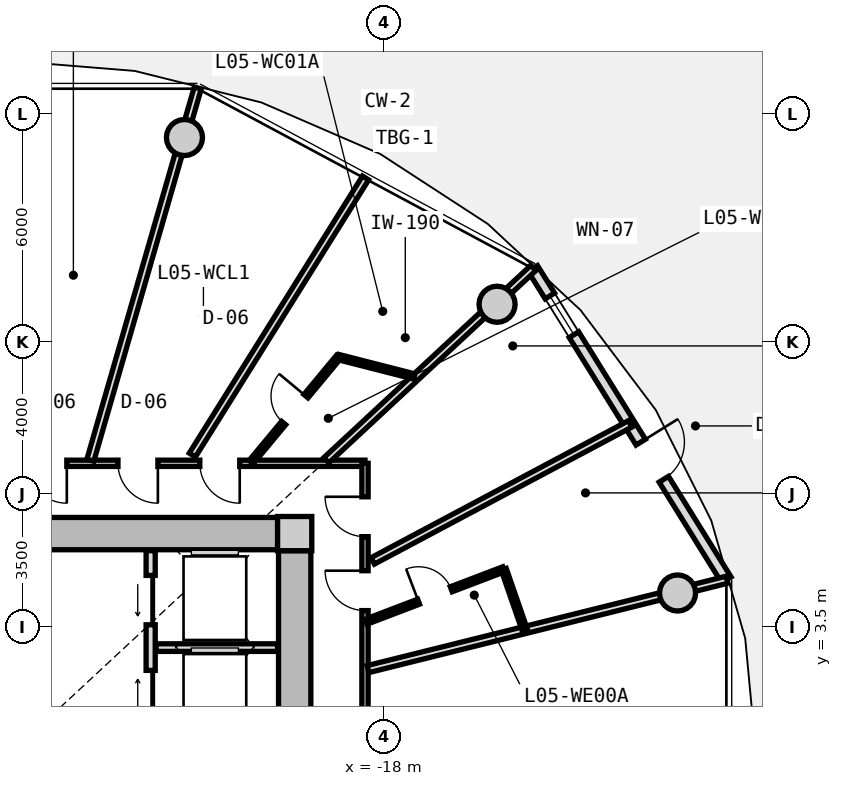
"""IFC4 building model, lengths in metres.
Left out: names, types, materials, properties, quantities, classifications, styles, units other than length and angle.
Written with IfcOpenShell. Run it as: python <this file> out.ifc"""

import sys

from ifc_helpers import new_model, si_unit, direction, frame, frame_2d, origin, origin_2d, place, context, subcontext, project, spatial, rectangle, circle, extrude, source, transform, mapped, element, fill, save


model = new_model("IFC4")
c1 = context("Model", 3, precision=1e-05, world=origin(), true_north=direction((0.0, 1.0)))
c2 = subcontext(c1, "Body", "Model", "MODEL_VIEW")
j1 = project(units=[si_unit("LENGTHUNIT", "METRE"), si_unit("PLANEANGLEUNIT", "RADIAN")], contexts=[c1])
p1 = place(None, origin())
s1 = spatial("IfcSite", under=j1, at=p1, CompositionType="ELEMENT")
p2 = place(p1, origin())
s2 = spatial("IfcBuilding", under=s1, at=p2, CompositionType="ELEMENT")
p3 = place(p2, frame((0.0, 0.0, 21.6)))
s3 = spatial("IfcBuildingStorey", under=s2, at=p3, CompositionType="ELEMENT", Elevation=21.6)
m1 = source(origin(), c2, "Body", "SweptSolid", [
    extrude(rectangle(XDim=0.9, YDim=0.9, at=origin_2d()), origin(), (0.0, 0.0, 1.0), 3.05),
])
p4 = place(p3, frame((-20.35, 5.95, 0.0), z_axis=(0.0, 0.0, 1.0), x_axis=(1.0, 0.0, 0.0)))
e1 = element("IfcColumn", 1, at=p4, inside=s3, PredefinedType="COLUMN", context=c2, shape_type="MappedRepresentation", body=[
    mapped(m1, transform((0.0, 0.0, 0.0), x_axis=(1.0, 0.0, 0.0), y_axis=(0.0, 1.0, 0.0), z_axis=(0.0, 0.0, 1.0), scale=1.0)),
])
m2 = source(origin(), c2, "Body", "SweptSolid", [
    extrude(rectangle(XDim=14.4, YDim=0.85, at=frame_2d((7.2, 0.0))), origin(), (0.0, 0.0, 1.0), 2.79),
])
p5 = place(p3, frame((-35.2, 5.95, 0.0), z_axis=(0.0, 0.0, 1.0), x_axis=(1.0, 0.0, 0.0)))
e2 = element("IfcWall", 2, at=p5, inside=s3, PredefinedType="SHEAR", context=c2, shape_type="MappedRepresentation", body=[
    mapped(m2, transform((0.0, 0.0, 0.0), x_axis=(1.0, 0.0, 0.0), y_axis=(0.0, 1.0, 0.0), z_axis=(0.0, 0.0, 1.0), scale=1.0)),
])
m3 = source(origin(), c2, "Body", "SweptSolid", [
    extrude(rectangle(XDim=11.0, YDim=0.85, at=frame_2d((5.5, 0.0))), origin(), (0.0, 0.0, 1.0), 2.79),
])
p6 = place(p3, frame((-20.35, 5.5, 0.0), z_axis=(0.0, 0.0, 1.0), x_axis=(0.0, -1.0, 0.0)))
e3 = element("IfcWall", 3, at=p6, inside=s3, PredefinedType="SHEAR", context=c2, shape_type="MappedRepresentation", body=[
    mapped(m3, transform((0.0, 0.0, 0.0), x_axis=(1.0, 0.0, 0.0), y_axis=(0.0, 1.0, 0.0), z_axis=(0.0, 0.0, 1.0), scale=1.0)),
])
p7 = place(p6, frame((5.65, 0.0, 0.0)))
e4 = element("IfcOpeningElement", 4, at=p7, cuts=e3, PredefinedType="OPENING", context=c2, shape_type="SweptSolid", body=[
    extrude(rectangle(XDim=1.2, YDim=2.15, at=frame_2d((0.6, 1.075))), frame((0.0, 0.435, 0.0), z_axis=(0.0, -1.0, 0.0), x_axis=(1.0, 0.0, 0.0)), (0.0, 0.0, 1.0), 0.87),
])
p8 = place(p6, frame((9.3, 0.0, 0.0)))
e5 = element("IfcOpeningElement", 5, at=p8, cuts=e3, PredefinedType="OPENING", context=c2, shape_type="SweptSolid", body=[
    extrude(rectangle(XDim=1.0, YDim=2.1, at=frame_2d((0.5, 1.05))), frame((0.0, 0.435, 0.0), z_axis=(0.0, -1.0, 0.0), x_axis=(1.0, 0.0, 0.0)), (0.0, 0.0, 1.0), 0.87),
])
m4 = source(origin(), c2, "Body", "SweptSolid", [
    extrude(circle(Radius=0.475, at=origin_2d()), origin(), (0.0, 0.0, 1.0), 3.47),
])
for number, where, z_axis, x_axis in (
    (6, (-10.275, 4.387, -0.42), (0.0, 0.0, 1.0), (1.0, 0.0, 0.0)),
    (7, (-15.025, 11.985, -0.42), (0.0, 0.0, 1.0), (1.0, 0.0, 0.0)),
    (8, (-23.251, 16.373, -0.42), (0.0, 0.0, 1.0), (1.0, 0.0, 0.0)),
):
    element("IfcColumn", number, at=place(p3, frame(where, z_axis=z_axis, x_axis=x_axis)), inside=s3, PredefinedType="COLUMN", context=c2, shape_type="MappedRepresentation", body=[
        mapped(m4, transform((0.0, 0.0, 0.0), x_axis=(1.0, 0.0, 0.0), y_axis=(0.0, 1.0, 0.0), z_axis=(0.0, 0.0, 1.0), scale=1.0)),
    ])
m5 = source(origin(), c2, "Body", "SweptSolid", [
    extrude(rectangle(XDim=9.649, YDim=0.29, at=frame_2d((4.824, 0.0))), origin(), (0.0, 0.0, 1.0), 2.79),
])
p9 = place(p3, frame((-14.084, 12.926, 0.0), z_axis=(0.0, 0.0, 1.0), x_axis=(0.527909458386, -0.849300655684, 0.0)))
e9 = element("IfcWall", 9, at=p9, inside=s3, PredefinedType="SOLIDWALL", context=c2, shape_type="MappedRepresentation", body=[
    mapped(m5, transform((0.0, 0.0, 0.0), x_axis=(1.0, 0.0, 0.0), y_axis=(0.0, 1.0, 0.0), z_axis=(0.0, 0.0, 1.0), scale=1.0)),
])
p10 = place(p9, frame((5.38, 0.0, 0.0)))
e10 = element("IfcOpeningElement", 10, at=p10, cuts=e9, PredefinedType="OPENING", context=c2, shape_type="SweptSolid", body=[
    extrude(rectangle(XDim=1.15, YDim=2.25, at=frame_2d((0.575, 1.125))), frame((0.0, 0.155, 0.0), z_axis=(0.0, -1.0, 0.0), x_axis=(1.0, 0.0, 0.0)), (0.0, 0.0, 1.0), 0.31),
])
p11 = place(p9, frame((0.85, 0.0, 0.85)))
e11 = element("IfcOpeningElement", 11, at=p11, cuts=e9, PredefinedType="OPENING", context=c2, shape_type="SweptSolid", body=[
    extrude(rectangle(XDim=1.2, YDim=1.5, at=frame_2d((0.6, 0.75))), frame((0.0, 0.155, 0.0), z_axis=(0.0, -1.0, 0.0), x_axis=(1.0, 0.0, 0.0)), (0.0, 0.0, 1.0), 0.31),
])
m6 = source(origin(), c2, "Body", "SweptSolid", [
    extrude(rectangle(XDim=5.0, YDim=0.24, at=frame_2d((2.5, 0.0))), origin(), (0.0, 0.0, 1.0), 2.775),
])
p12 = place(p3, frame((-24.14, 0.5, 0.0), z_axis=(0.0, 0.0, 1.0), x_axis=(0.0, 1.0, 0.0)))
e12 = element("IfcWall", 12, at=p12, inside=s3, PredefinedType="PARTITIONING", context=c2, shape_type="MappedRepresentation", body=[
    mapped(m6, transform((0.0, 0.0, 0.0), x_axis=(1.0, 0.0, 0.0), y_axis=(0.0, 1.0, 0.0), z_axis=(0.0, 0.0, 1.0), scale=1.0)),
])
p13 = place(p12, frame((3.05, 0.0, 0.0)))
e13 = element("IfcOpeningElement", 13, at=p13, cuts=e12, PredefinedType="OPENING", context=c2, shape_type="SweptSolid", body=[
    extrude(rectangle(XDim=1.3, YDim=2.2, at=frame_2d((0.65, 1.1))), frame((0.0, 0.13, 0.0), z_axis=(0.0, -1.0, 0.0), x_axis=(1.0, 0.0, 0.0)), (0.0, 0.0, 1.0), 0.26),
])
p14 = place(p12, frame((0.55, 0.0, 0.0)))
e14 = element("IfcOpeningElement", 14, at=p14, cuts=e12, PredefinedType="OPENING", context=c2, shape_type="SweptSolid", body=[
    extrude(rectangle(XDim=1.3, YDim=2.2, at=frame_2d((0.65, 1.1))), frame((0.0, 0.13, 0.0), z_axis=(0.0, -1.0, 0.0), x_axis=(1.0, 0.0, 0.0)), (0.0, 0.0, 1.0), 0.26),
])
m7 = source(origin(), c2, "Body", "SweptSolid", [
    extrude(rectangle(XDim=3.2, YDim=0.2, at=frame_2d((1.6, 0.0))), origin(), (0.0, 0.0, 1.0), 2.775),
])
p15 = place(p3, frame((-24.0, 2.95, 0.0), z_axis=(0.0, 0.0, 1.0), x_axis=(1.0, 0.0, 0.0)))
e15 = element("IfcWall", 15, at=p15, inside=s3, PredefinedType="PARTITIONING", context=c2, shape_type="MappedRepresentation", body=[
    mapped(m7, transform((0.0, 0.0, 0.0), x_axis=(1.0, 0.0, 0.0), y_axis=(0.0, 1.0, 0.0), z_axis=(0.0, 0.0, 1.0), scale=1.0)),
])
m8 = source(origin(), c2, "Body", "SweptSolid", [
    extrude(rectangle(XDim=19.0, YDim=0.165, at=frame_2d((9.5, 0.0))), origin(), (0.0, 0.0, 1.0), 2.775),
])
p16 = place(p3, frame((-37.5, 7.8, 0.0), z_axis=(0.0, 0.0, 1.0), x_axis=(1.0, 0.0, 0.0)))
e16 = element("IfcWall", 16, at=p16, inside=s3, PredefinedType="PARTITIONING", context=c2, shape_type="MappedRepresentation", body=[
    mapped(m8, transform((0.0, 0.0, 0.0), x_axis=(1.0, 0.0, 0.0), y_axis=(0.0, 1.0, 0.0), z_axis=(0.0, 0.0, 1.0), scale=1.0)),
])
p17 = place(p16, frame((14.653, 0.0, 0.0)))
e17 = element("IfcOpeningElement", 17, at=p17, cuts=e16, PredefinedType="OPENING", context=c2, shape_type="SweptSolid", body=[
    extrude(rectangle(XDim=1.05, YDim=2.15, at=frame_2d((0.525, 1.075))), frame((0.0, 0.093, 0.0), z_axis=(0.0, -1.0, 0.0), x_axis=(1.0, 0.0, 0.0)), (0.0, 0.0, 1.0), 0.185),
])
p18 = place(p16, frame((12.5, 0.0, 0.0)))
e18 = element("IfcOpeningElement", 18, at=p18, cuts=e16, PredefinedType="OPENING", context=c2, shape_type="SweptSolid", body=[
    extrude(rectangle(XDim=1.05, YDim=2.15, at=frame_2d((0.525, 1.075))), frame((0.0, 0.093, 0.0), z_axis=(0.0, -1.0, 0.0), x_axis=(1.0, 0.0, 0.0)), (0.0, 0.0, 1.0), 0.185),
])
p19 = place(p16, frame((10.104, 0.0, 0.0)))
e19 = element("IfcOpeningElement", 19, at=p19, cuts=e16, PredefinedType="OPENING", context=c2, shape_type="SweptSolid", body=[
    extrude(rectangle(XDim=1.05, YDim=2.15, at=frame_2d((0.525, 1.075))), frame((0.0, 0.093, 0.0), z_axis=(0.0, -1.0, 0.0), x_axis=(1.0, 0.0, 0.0)), (0.0, 0.0, 1.0), 0.185),
])
p20 = place(p16, frame((7.806, 0.0, 0.0)))
e20 = element("IfcOpeningElement", 20, at=p20, cuts=e16, PredefinedType="OPENING", context=c2, shape_type="SweptSolid", body=[
    extrude(rectangle(XDim=1.05, YDim=2.15, at=frame_2d((0.525, 1.075))), frame((0.0, 0.093, 0.0), z_axis=(0.0, -1.0, 0.0), x_axis=(1.0, 0.0, 0.0)), (0.0, 0.0, 1.0), 0.185),
])
p21 = place(p16, frame((5.915, 0.0, 0.0)))
e21 = element("IfcOpeningElement", 21, at=p21, cuts=e16, PredefinedType="OPENING", context=c2, shape_type="SweptSolid", body=[
    extrude(rectangle(XDim=0.92, YDim=2.1, at=frame_2d((0.46, 1.05))), frame((0.0, 0.093, 0.0), z_axis=(0.0, -1.0, 0.0), x_axis=(1.0, 0.0, 0.0)), (0.0, 0.0, 1.0), 0.185),
])
p22 = place(p16, frame((2.769, 0.0, 0.0)))
e22 = element("IfcOpeningElement", 22, at=p22, cuts=e16, PredefinedType="OPENING", context=c2, shape_type="SweptSolid", body=[
    extrude(rectangle(XDim=0.92, YDim=2.1, at=frame_2d((0.46, 1.05))), frame((0.0, 0.093, 0.0), z_axis=(0.0, -1.0, 0.0), x_axis=(1.0, 0.0, 0.0)), (0.0, 0.0, 1.0), 0.185),
])
m9 = source(origin(), c2, "Body", "SweptSolid", [
    extrude(rectangle(XDim=15.6, YDim=0.165, at=frame_2d((7.8, 0.0))), origin(), (0.0, 0.0, 1.0), 2.775),
])
p23 = place(p3, frame((-18.5, 7.8, 0.0), z_axis=(0.0, 0.0, 1.0), x_axis=(0.0, -1.0, 0.0)))
e23 = element("IfcWall", 23, at=p23, inside=s3, PredefinedType="PARTITIONING", context=c2, shape_type="MappedRepresentation", body=[
    mapped(m9, transform((0.0, 0.0, 0.0), x_axis=(1.0, 0.0, 0.0), y_axis=(0.0, 1.0, 0.0), z_axis=(0.0, 0.0, 1.0), scale=1.0)),
])
p24 = place(p23, frame((12.141, 0.0, 0.0)))
e24 = element("IfcOpeningElement", 24, at=p24, cuts=e23, PredefinedType="OPENING", context=c2, shape_type="SweptSolid", body=[
    extrude(rectangle(XDim=1.25, YDim=2.2, at=frame_2d((0.625, 1.1))), frame((0.0, 0.093, 0.0), z_axis=(0.0, -1.0, 0.0), x_axis=(1.0, 0.0, 0.0)), (0.0, 0.0, 1.0), 0.185),
])
p25 = place(p23, frame((7.175, 0.0, 0.0)))
e25 = element("IfcOpeningElement", 25, at=p25, cuts=e23, PredefinedType="OPENING", context=c2, shape_type="SweptSolid", body=[
    extrude(rectangle(XDim=1.25, YDim=2.2, at=frame_2d((0.625, 1.1))), frame((0.0, 0.093, 0.0), z_axis=(0.0, -1.0, 0.0), x_axis=(1.0, 0.0, 0.0)), (0.0, 0.0, 1.0), 0.185),
])
p26 = place(p23, frame((2.826, 0.0, 0.0)))
e26 = element("IfcOpeningElement", 26, at=p26, cuts=e23, PredefinedType="OPENING", context=c2, shape_type="SweptSolid", body=[
    extrude(rectangle(XDim=1.05, YDim=2.15, at=frame_2d((0.525, 1.075))), frame((0.0, 0.093, 0.0), z_axis=(0.0, -1.0, 0.0), x_axis=(1.0, 0.0, 0.0)), (0.0, 0.0, 1.0), 0.185),
])
p27 = place(p23, frame((0.881, 0.0, 0.0)))
e27 = element("IfcOpeningElement", 27, at=p27, cuts=e23, PredefinedType="OPENING", context=c2, shape_type="SweptSolid", body=[
    extrude(rectangle(XDim=1.05, YDim=2.15, at=frame_2d((0.525, 1.075))), frame((0.0, 0.093, 0.0), z_axis=(0.0, -1.0, 0.0), x_axis=(1.0, 0.0, 0.0)), (0.0, 0.0, 1.0), 0.185),
])
m10 = source(origin(), c2, "Body", "SweptSolid", [
    extrude(rectangle(XDim=7.435, YDim=0.19, at=frame_2d((3.717, 0.0))), origin(), (0.0, 0.0, 1.0), 2.225),
])
p28 = place(p3, frame((-19.517, 7.88, 0.0), z_axis=(0.0, 0.0, 1.0), x_axis=(0.732651956848, 0.680603489652, 0.0)))
e28 = element("IfcWall", 28, at=p28, inside=s3, PredefinedType="PARTITIONING", context=c2, shape_type="MappedRepresentation", body=[
    mapped(m10, transform((0.0, 0.0, 0.0), x_axis=(1.0, 0.0, 0.0), y_axis=(0.0, 1.0, 0.0), z_axis=(0.0, 0.0, 1.0), scale=1.0)),
])
m11 = source(origin(), c2, "Body", "SweptSolid", [
    extrude(rectangle(XDim=10.196, YDim=0.19, at=frame_2d((5.098, 0.0))), origin(), (0.0, 0.0, 1.0), 2.225),
])
p29 = place(p3, frame((-25.727, 7.88, 0.0), z_axis=(0.0, 0.0, 1.0), x_axis=(0.277136420347, 0.960830580549, 0.0)))
e29 = element("IfcWall", 29, at=p29, inside=s3, PredefinedType="PARTITIONING", context=c2, shape_type="MappedRepresentation", body=[
    mapped(m11, transform((0.0, 0.0, 0.0), x_axis=(1.0, 0.0, 0.0), y_axis=(0.0, 1.0, 0.0), z_axis=(0.0, 0.0, 1.0), scale=1.0)),
])
m12 = source(origin(), c2, "Body", "SweptSolid", [
    extrude(rectangle(XDim=8.598, YDim=0.19, at=frame_2d((4.299, 0.0))), origin(), (0.0, 0.0, 1.0), 2.775),
])
p30 = place(p3, frame((-23.043, 8.017, 0.0), z_axis=(0.0, 0.0, 1.0), x_axis=(0.530039776395, 0.847972779893, 0.0)))
e30 = element("IfcWall", 30, at=p30, inside=s3, PredefinedType="PARTITIONING", context=c2, shape_type="MappedRepresentation", body=[
    mapped(m12, transform((0.0, 0.0, 0.0), x_axis=(1.0, 0.0, 0.0), y_axis=(0.0, 1.0, 0.0), z_axis=(0.0, 0.0, 1.0), scale=1.0)),
])
m13 = source(origin(), c2, "Body", "SweptSolid", [
    extrude(rectangle(XDim=3.594, YDim=0.14, at=frame_2d((1.797, 0.0))), origin(), (0.0, 0.0, 1.0), 2.775),
])
p31 = place(p3, frame((-21.496, 7.83, 0.0), z_axis=(0.0, 0.0, 1.0), x_axis=(0.639001147083, 0.769205781326, 0.0)))
e31 = element("IfcWall", 31, at=p31, inside=s3, PredefinedType="PARTITIONING", context=c2, shape_type="MappedRepresentation", body=[
    mapped(m13, transform((0.0, 0.0, 0.0), x_axis=(1.0, 0.0, 0.0), y_axis=(0.0, 1.0, 0.0), z_axis=(0.0, 0.0, 1.0), scale=1.0)),
])
p32 = place(p31, frame((1.337, 0.0, 0.0)))
e32 = element("IfcOpeningElement", 32, at=p32, cuts=e31, PredefinedType="OPENING", context=c2, shape_type="SweptSolid", body=[
    extrude(rectangle(XDim=0.92, YDim=2.1, at=frame_2d((0.46, 1.05))), frame((0.0, 0.08, 0.0), z_axis=(0.0, -1.0, 0.0), x_axis=(1.0, 0.0, 0.0)), (0.0, 0.0, 1.0), 0.16),
])
m14 = source(origin(), c2, "Body", "SweptSolid", [
    extrude(rectangle(XDim=2.062, YDim=0.14, at=frame_2d((1.031, 0.0))), origin(), (0.0, 0.0, 1.0), 2.415),
])
p33 = place(p3, frame((-19.199, 10.595, 0.0), z_axis=(0.0, 0.0, 1.0), x_axis=(0.968776253543, -0.247936626121, 0.0)))
e33 = element("IfcWall", 33, at=p33, inside=s3, PredefinedType="PARTITIONING", context=c2, shape_type="MappedRepresentation", body=[
    mapped(m14, transform((0.0, 0.0, 0.0), x_axis=(1.0, 0.0, 0.0), y_axis=(0.0, 1.0, 0.0), z_axis=(0.0, 0.0, 1.0), scale=1.0)),
])
m15 = source(origin(), c2, "Body", "SweptSolid", [
    extrude(rectangle(XDim=9.737, YDim=0.19, at=frame_2d((4.869, 0.0))), origin(), (0.0, 0.0, 1.0), 2.225),
])
p34 = place(p3, frame((-18.42, 2.385, 0.0), z_axis=(0.0, 0.0, 1.0), x_axis=(0.970392716238, 0.241532557375, 0.0)))
e34 = element("IfcWall", 34, at=p34, inside=s3, PredefinedType="PARTITIONING", context=c2, shape_type="MappedRepresentation", body=[
    mapped(m15, transform((0.0, 0.0, 0.0), x_axis=(1.0, 0.0, 0.0), y_axis=(0.0, 1.0, 0.0), z_axis=(0.0, 0.0, 1.0), scale=1.0)),
])
m16 = source(origin(), c2, "Body", "SweptSolid", [
    extrude(rectangle(XDim=7.677, YDim=0.19, at=frame_2d((3.838, 0.0))), origin(), (0.0, 0.0, 1.0), 2.775),
])
p35 = place(p3, frame((-18.297, 5.231, 0.0), z_axis=(0.0, 0.0, 1.0), x_axis=(0.882725057546, 0.469889851753, 0.0)))
e35 = element("IfcWall", 35, at=p35, inside=s3, PredefinedType="PARTITIONING", context=c2, shape_type="MappedRepresentation", body=[
    mapped(m16, transform((0.0, 0.0, 0.0), x_axis=(1.0, 0.0, 0.0), y_axis=(0.0, 1.0, 0.0), z_axis=(0.0, 0.0, 1.0), scale=1.0)),
])
m17 = source(origin(), c2, "Body", "SweptSolid", [
    extrude(rectangle(XDim=3.874, YDim=0.14, at=frame_2d((1.937, 0.0))), origin(), (0.0, 0.0, 1.0), 2.775),
])
p36 = place(p3, frame((-18.47, 3.632, 0.0), z_axis=(0.0, 0.0, 1.0), x_axis=(0.934461775659, 0.35606346321, 0.0)))
e36 = element("IfcWall", 36, at=p36, inside=s3, PredefinedType="PARTITIONING", context=c2, shape_type="MappedRepresentation", body=[
    mapped(m17, transform((0.0, 0.0, 0.0), x_axis=(1.0, 0.0, 0.0), y_axis=(0.0, 1.0, 0.0), z_axis=(0.0, 0.0, 1.0), scale=1.0)),
])
p37 = place(p36, frame((1.477, 0.0, 0.0)))
e37 = element("IfcOpeningElement", 37, at=p37, cuts=e36, PredefinedType="OPENING", context=c2, shape_type="SweptSolid", body=[
    extrude(rectangle(XDim=0.92, YDim=2.1, at=frame_2d((0.46, 1.05))), frame((0.0, 0.08, 0.0), z_axis=(0.0, -1.0, 0.0), x_axis=(1.0, 0.0, 0.0)), (0.0, 0.0, 1.0), 0.16),
])
m18 = source(origin(), c2, "Body", "SweptSolid", [
    extrude(rectangle(XDim=1.676, YDim=0.14, at=frame_2d((0.838, 0.0))), origin(), (0.0, 0.0, 1.0), 2.775),
])
p38 = place(p3, frame((-14.85, 5.011, 0.0), z_axis=(0.0, 0.0, 1.0), x_axis=(0.327785970556, -0.944752008469, 0.0)))
e38 = element("IfcWall", 38, at=p38, inside=s3, PredefinedType="PARTITIONING", context=c2, shape_type="MappedRepresentation", body=[
    mapped(m18, transform((0.0, 0.0, 0.0), x_axis=(1.0, 0.0, 0.0), y_axis=(0.0, 1.0, 0.0), z_axis=(0.0, 0.0, 1.0), scale=1.0)),
])
m19 = source(origin(), c2, "Body", "SweptSolid", [
    extrude(rectangle(XDim=1.15, YDim=2.25, at=frame_2d((0.575, 1.125))), frame((0.0, 0.025, 0.0), z_axis=(0.0, -1.0, 0.0), x_axis=(1.0, 0.0, 0.0)), (0.0, 0.0, 1.0), 0.05),
])
p39 = place(p10, origin())
e39 = element("IfcDoor", 39, at=p39, inside=s3, OperationType="SINGLE_SWING_LEFT", PredefinedType="DOOR", context=c2, shape_type="MappedRepresentation", body=[
    mapped(m19, transform((0.0, 0.0, 0.0), x_axis=(1.0, 0.0, 0.0), y_axis=(0.0, 1.0, 0.0), z_axis=(0.0, 0.0, 1.0), scale=1.0)),
])
fill(e10, e39)
m20 = source(origin(), c2, "Body", "SweptSolid", [
    extrude(rectangle(XDim=1.2, YDim=1.5, at=frame_2d((0.6, 0.75))), frame((0.0, 0.03, 0.0), z_axis=(0.0, -1.0, 0.0), x_axis=(1.0, 0.0, 0.0)), (0.0, 0.0, 1.0), 0.06),
])
p40 = place(p11, origin())
e40 = element("IfcWindow", 40, at=p40, inside=s3, PartitioningType="SINGLE_PANEL", PredefinedType="WINDOW", context=c2, shape_type="MappedRepresentation", body=[
    mapped(m20, transform((0.0, 0.0, 0.0), x_axis=(1.0, 0.0, 0.0), y_axis=(0.0, 1.0, 0.0), z_axis=(0.0, 0.0, 1.0), scale=1.0)),
])
fill(e11, e40)
m21 = source(origin(), c2, "Body", "SweptSolid", [
    extrude(rectangle(XDim=1.3, YDim=2.2, at=frame_2d((0.65, 1.1))), frame((0.0, 0.025, 0.0), z_axis=(0.0, -1.0, 0.0), x_axis=(1.0, 0.0, 0.0)), (0.0, 0.0, 1.0), 0.05),
])
p41 = place(p13, origin())
e41 = element("IfcDoor", 41, at=p41, inside=s3, OperationType="SLIDING_TO_LEFT", PredefinedType="DOOR", context=c2, shape_type="MappedRepresentation", body=[
    mapped(m21, transform((0.0, 0.0, 0.0), x_axis=(1.0, 0.0, 0.0), y_axis=(0.0, 1.0, 0.0), z_axis=(0.0, 0.0, 1.0), scale=1.0)),
])
fill(e13, e41)
p42 = place(p14, origin())
e42 = element("IfcDoor", 42, at=p42, inside=s3, OperationType="SLIDING_TO_RIGHT", PredefinedType="DOOR", context=c2, shape_type="MappedRepresentation", body=[
    mapped(m21, transform((0.0, 0.0, 0.0), x_axis=(1.0, 0.0, 0.0), y_axis=(0.0, 1.0, 0.0), z_axis=(0.0, 0.0, 1.0), scale=1.0)),
])
fill(e14, e42)
m22 = source(origin(), c2, "Body", "SweptSolid", [
    extrude(rectangle(XDim=1.05, YDim=2.15, at=frame_2d((0.525, 1.075))), frame((0.0, 0.025, 0.0), z_axis=(0.0, -1.0, 0.0), x_axis=(1.0, 0.0, 0.0)), (0.0, 0.0, 1.0), 0.05),
])
p43 = place(p17, frame((1.05, 0.0, 0.0), z_axis=(0.0, 0.0, 1.0), x_axis=(-1.0, 0.0, 0.0)))
e43 = element("IfcDoor", 43, at=p43, inside=s3, OperationType="SINGLE_SWING_LEFT", PredefinedType="DOOR", context=c2, shape_type="MappedRepresentation", body=[
    mapped(m22, transform((0.0, 0.0, 0.0), x_axis=(1.0, 0.0, 0.0), y_axis=(0.0, 1.0, 0.0), z_axis=(0.0, 0.0, 1.0), scale=1.0)),
])
fill(e17, e43)
m23 = source(origin(), c2, "Body", "SweptSolid", [
    extrude(rectangle(XDim=0.92, YDim=2.1, at=frame_2d((0.46, 1.05))), frame((0.0, 0.025, 0.0), z_axis=(0.0, -1.0, 0.0), x_axis=(1.0, 0.0, 0.0)), (0.0, 0.0, 1.0), 0.05),
])
p44 = place(p32, origin())
e44 = element("IfcDoor", 44, at=p44, inside=s3, OperationType="SINGLE_SWING_RIGHT", PredefinedType="DOOR", context=c2, shape_type="MappedRepresentation", body=[
    mapped(m23, transform((0.0, 0.0, 0.0), x_axis=(1.0, 0.0, 0.0), y_axis=(0.0, 1.0, 0.0), z_axis=(0.0, 0.0, 1.0), scale=1.0)),
])
fill(e32, e44)
p45 = place(p18, frame((1.05, 0.0, 0.0), z_axis=(0.0, 0.0, 1.0), x_axis=(-1.0, 0.0, 0.0)))
e45 = element("IfcDoor", 45, at=p45, inside=s3, OperationType="SINGLE_SWING_LEFT", PredefinedType="DOOR", context=c2, shape_type="MappedRepresentation", body=[
    mapped(m22, transform((0.0, 0.0, 0.0), x_axis=(1.0, 0.0, 0.0), y_axis=(0.0, 1.0, 0.0), z_axis=(0.0, 0.0, 1.0), scale=1.0)),
])
fill(e18, e45)
p46 = place(p19, frame((1.05, 0.0, 0.0), z_axis=(0.0, 0.0, 1.0), x_axis=(-1.0, 0.0, 0.0)))
e46 = element("IfcDoor", 46, at=p46, inside=s3, OperationType="SINGLE_SWING_LEFT", PredefinedType="DOOR", context=c2, shape_type="MappedRepresentation", body=[
    mapped(m22, transform((0.0, 0.0, 0.0), x_axis=(1.0, 0.0, 0.0), y_axis=(0.0, 1.0, 0.0), z_axis=(0.0, 0.0, 1.0), scale=1.0)),
])
fill(e19, e46)
p47 = place(p26, frame((1.05, 0.0, 0.0), z_axis=(0.0, 0.0, 1.0), x_axis=(-1.0, 0.0, 0.0)))
e47 = element("IfcDoor", 47, at=p47, inside=s3, OperationType="SINGLE_SWING_RIGHT", PredefinedType="DOOR", context=c2, shape_type="MappedRepresentation", body=[
    mapped(m22, transform((0.0, 0.0, 0.0), x_axis=(1.0, 0.0, 0.0), y_axis=(0.0, 1.0, 0.0), z_axis=(0.0, 0.0, 1.0), scale=1.0)),
])
fill(e26, e47)
p48 = place(p37, origin())
e48 = element("IfcDoor", 48, at=p48, inside=s3, OperationType="SINGLE_SWING_LEFT", PredefinedType="DOOR", context=c2, shape_type="MappedRepresentation", body=[
    mapped(m23, transform((0.0, 0.0, 0.0), x_axis=(1.0, 0.0, 0.0), y_axis=(0.0, 1.0, 0.0), z_axis=(0.0, 0.0, 1.0), scale=1.0)),
])
fill(e37, e48)
p49 = place(p27, frame((1.05, 0.0, 0.0), z_axis=(0.0, 0.0, 1.0), x_axis=(-1.0, 0.0, 0.0)))
e49 = element("IfcDoor", 49, at=p49, inside=s3, OperationType="SINGLE_SWING_RIGHT", PredefinedType="DOOR", context=c2, shape_type="MappedRepresentation", body=[
    mapped(m22, transform((0.0, 0.0, 0.0), x_axis=(1.0, 0.0, 0.0), y_axis=(0.0, 1.0, 0.0), z_axis=(0.0, 0.0, 1.0), scale=1.0)),
])
fill(e27, e49)
save(model, sys.argv[1])
